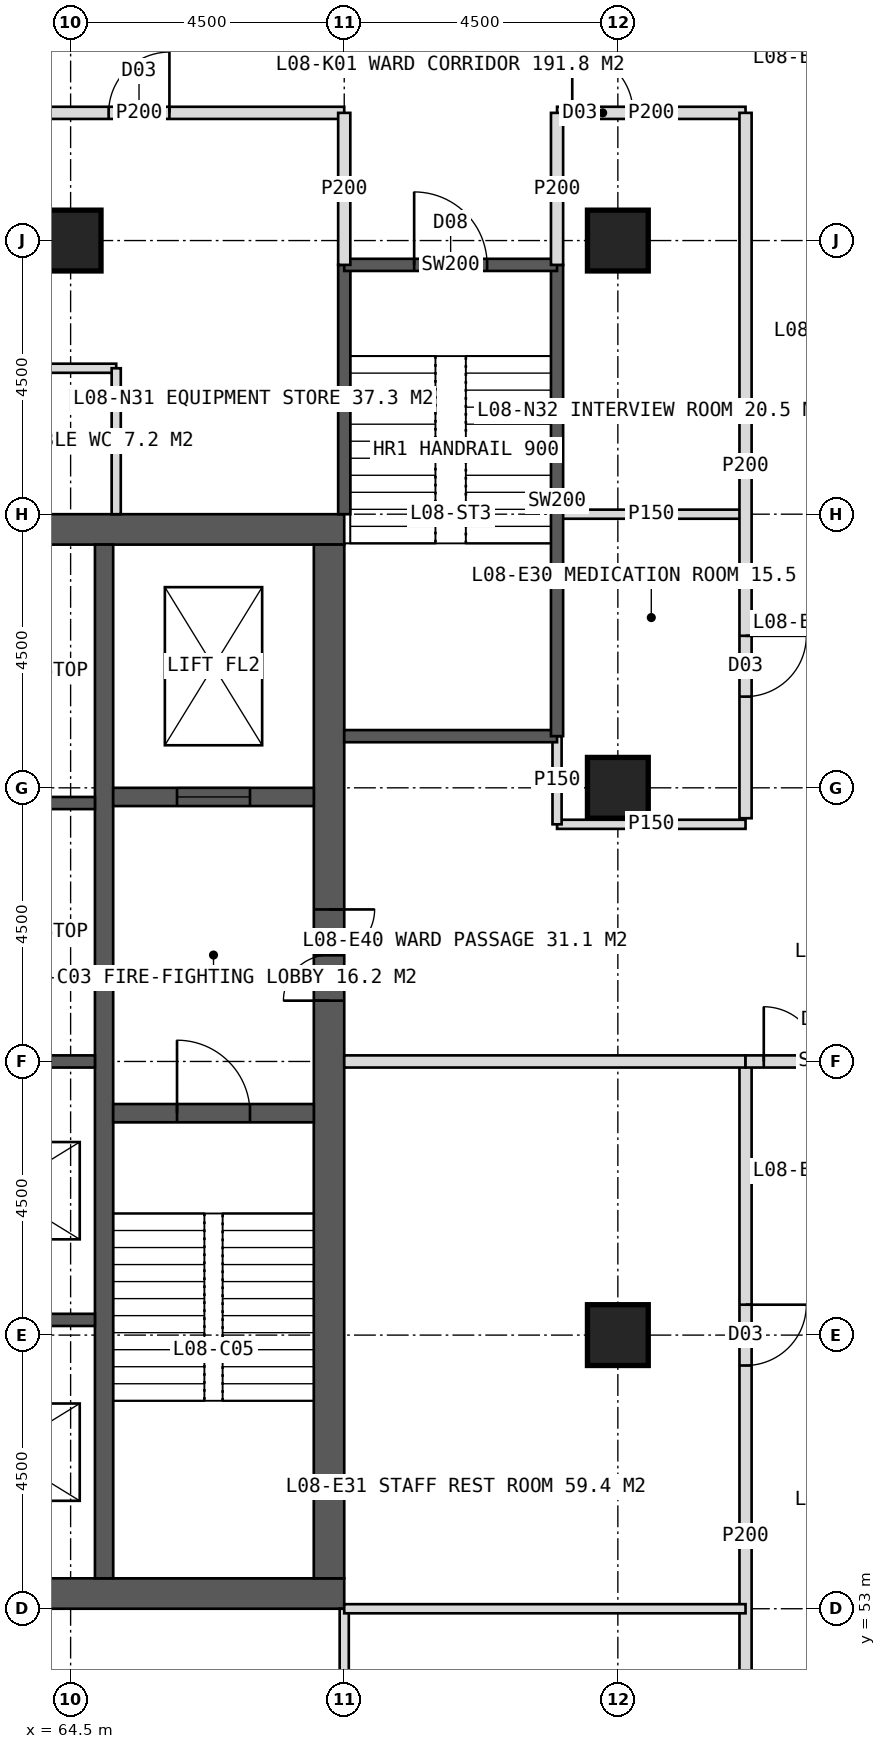
"""IFC4 building model, lengths in metres.
Left out: names, types, materials, properties, quantities, classifications, styles, units other than length and angle.
Written with IfcOpenShell. Run it as: python <this file> out.ifc"""

import sys

from ifc_helpers import new_model, si_unit, direction, frame, frame_2d, origin, origin_2d, place, context, subcontext, project, spatial, rectangle, hollow_rectangle, extrude, element, fill, save


model = new_model("IFC4")
c1 = context("Model", 3, precision=1e-05, world=origin(), true_north=direction((0.0, 1.0)))
c2 = subcontext(c1, "Body", "Model", "MODEL_VIEW")
j1 = project(units=[si_unit("LENGTHUNIT", "METRE"), si_unit("PLANEANGLEUNIT", "RADIAN")], contexts=[c1])
p1 = place(None, origin())
s1 = spatial("IfcSite", under=j1, at=p1, CompositionType="ELEMENT")
p2 = place(p1, origin())
s2 = spatial("IfcBuilding", under=s1, at=p2, CompositionType="ELEMENT")
p3 = place(p2, frame((0.0, 0.0, 39.0)))
s3 = spatial("IfcBuildingStorey", under=s2, at=p3, CompositionType="ELEMENT", Elevation=39.0)
p4 = place(p3, frame((51.0, 70.75, 0.0), z_axis=(0.0, 0.0, 1.0), x_axis=(1.0, 0.0, 0.0)))
e1 = element("IfcWall", 1, at=p4, inside=s3, PredefinedType="SHEAR", context=c2, shape_type="SweptSolid", body=[
    extrude(rectangle(XDim=18.0, YDim=0.5, at=frame_2d((9.0, 0.0))), origin(), (0.0, 0.0, 1.0), 4.0),
])
p5 = place(p4, frame((8.1, 0.0, 0.0)))
e2 = element("IfcOpeningElement", 2, at=p5, cuts=e1, PredefinedType="OPENING", context=c2, shape_type="SweptSolid", body=[
    extrude(rectangle(XDim=1.8, YDim=2.2, at=frame_2d((0.9, 1.1))), frame((0.0, 0.26, 0.0), z_axis=(0.0, -1.0, 0.0), x_axis=(1.0, 0.0, 0.0)), (0.0, 0.0, 1.0), 0.52),
])
p6 = place(p3, frame((51.0, 53.25, 0.0), z_axis=(0.0, 0.0, 1.0), x_axis=(1.0, 0.0, 0.0)))
e3 = element("IfcWall", 3, at=p6, inside=s3, PredefinedType="SHEAR", context=c2, shape_type="SweptSolid", body=[
    extrude(rectangle(XDim=18.0, YDim=0.5, at=frame_2d((9.0, 0.0))), origin(), (0.0, 0.0, 1.0), 4.0),
])
p7 = place(p6, frame((8.1, 0.0, 0.0)))
e4 = element("IfcOpeningElement", 4, at=p7, cuts=e3, PredefinedType="OPENING", context=c2, shape_type="SweptSolid", body=[
    extrude(rectangle(XDim=1.8, YDim=2.2, at=frame_2d((0.9, 1.1))), frame((0.0, 0.26, 0.0), z_axis=(0.0, -1.0, 0.0), x_axis=(1.0, 0.0, 0.0)), (0.0, 0.0, 1.0), 0.52),
])
p8 = place(p3, frame((68.75, 53.5, 0.0), z_axis=(0.0, 0.0, 1.0), x_axis=(0.0, 1.0, 0.0)))
e5 = element("IfcWall", 5, at=p8, inside=s3, PredefinedType="SHEAR", context=c2, shape_type="SweptSolid", body=[
    extrude(rectangle(XDim=17.0, YDim=0.5, at=frame_2d((8.5, 0.0))), origin(), (0.0, 0.0, 1.0), 4.0),
])
p9 = place(p8, frame((9.5, 0.0, 0.0)))
e6 = element("IfcOpeningElement", 6, at=p9, cuts=e5, PredefinedType="OPENING", context=c2, shape_type="SweptSolid", body=[
    extrude(rectangle(XDim=1.5, YDim=2.2, at=frame_2d((0.75, 1.1))), frame((0.0, 0.26, 0.0), z_axis=(0.0, -1.0, 0.0), x_axis=(1.0, 0.0, 0.0)), (0.0, 0.0, 1.0), 0.52),
])
p10 = place(p3, frame((65.05, 53.5, 0.0), z_axis=(0.0, 0.0, 1.0), x_axis=(0.0, 1.0, 0.0)))
e7 = element("IfcWall", 7, at=p10, inside=s3, PredefinedType="SHEAR", context=c2, shape_type="SweptSolid", body=[
    extrude(rectangle(XDim=17.0, YDim=0.3, at=frame_2d((8.5, 0.0))), origin(), (0.0, 0.0, 1.0), 4.0),
])
for number, where, z_axis, x_axis in (
    (8, (61.85, 57.75, 0.0), (0.0, 0.0, 1.0), (1.0, 0.0, 0.0)),
    (9, (61.85, 62.0, 0.0), (0.0, 0.0, 1.0), (1.0, 0.0, 0.0)),
    (10, (61.85, 66.25, 0.0), (0.0, 0.0, 1.0), (1.0, 0.0, 0.0)),
):
    element("IfcWall", number, at=place(p3, frame(where, z_axis=z_axis, x_axis=x_axis)), inside=s3, PredefinedType="SHEAR", context=c2, shape_type="SweptSolid", body=[
        extrude(rectangle(XDim=3.05, YDim=0.2, at=frame_2d((1.525, 0.0))), origin(), (0.0, 0.0, 1.0), 4.0),
    ])
p11 = place(p3, frame((65.2, 61.15, 0.0), z_axis=(0.0, 0.0, 1.0), x_axis=(1.0, 0.0, 0.0)))
e11 = element("IfcWall", 11, at=p11, inside=s3, PredefinedType="SHEAR", context=c2, shape_type="SweptSolid", body=[
    extrude(rectangle(XDim=3.3, YDim=0.3, at=frame_2d((1.65, 0.0))), origin(), (0.0, 0.0, 1.0), 4.0),
])
p12 = place(p11, frame((1.05, 0.0, 0.0)))
e12 = element("IfcOpeningElement", 12, at=p12, cuts=e11, PredefinedType="OPENING", context=c2, shape_type="SweptSolid", body=[
    extrude(rectangle(XDim=1.2, YDim=2.1, at=frame_2d((0.6, 1.05))), frame((0.0, 0.16, 0.0), z_axis=(0.0, -1.0, 0.0), x_axis=(1.0, 0.0, 0.0)), (0.0, 0.0, 1.0), 0.32),
])
p13 = place(p3, frame((65.2, 66.35, 0.0), z_axis=(0.0, 0.0, 1.0), x_axis=(1.0, 0.0, 0.0)))
e13 = element("IfcWall", 13, at=p13, inside=s3, PredefinedType="SHEAR", context=c2, shape_type="SweptSolid", body=[
    extrude(rectangle(XDim=3.3, YDim=0.3, at=frame_2d((1.65, 0.0))), origin(), (0.0, 0.0, 1.0), 4.0),
])
p14 = place(p13, frame((1.05, 0.0, 0.0)))
e14 = element("IfcOpeningElement", 14, at=p14, cuts=e13, PredefinedType="OPENING", context=c2, shape_type="SweptSolid", body=[
    extrude(rectangle(XDim=1.2, YDim=2.2, at=frame_2d((0.6, 1.1))), frame((0.0, 0.16, 0.0), z_axis=(0.0, -1.0, 0.0), x_axis=(1.0, 0.0, 0.0)), (0.0, 0.0, 1.0), 0.32),
])
for number, where, z_axis, x_axis in (
    (15, (73.5, 75.5, 0.0), (0.0, 0.0, 1.0), (1.0, 0.0, 0.0)),
    (16, (64.5, 75.5, 0.0), (0.0, 0.0, 1.0), (1.0, 0.0, 0.0)),
    (17, (73.5, 57.5, 0.0), (0.0, 0.0, 1.0), (1.0, 0.0, 0.0)),
    (18, (73.5, 66.5, 0.0), (0.0, 0.0, 1.0), (1.0, 0.0, 0.0)),
):
    element("IfcColumn", number, at=place(p3, frame(where, z_axis=z_axis, x_axis=x_axis)), inside=s3, PredefinedType="COLUMN", context=c2, shape_type="SweptSolid", body=[
        extrude(hollow_rectangle(XDim=1.0, YDim=1.0, WallThickness=0.1, at=origin_2d()), origin(), (0.0, 0.0, 1.0), 4.0),
    ])
p15 = place(p3, frame((62.25, 77.6, 0.0), z_axis=(0.0, 0.0, 1.0), x_axis=(1.0, 0.0, 0.0)))
e19 = element("IfcWall", 19, at=p15, inside=s3, PredefinedType="PARTITIONING", context=c2, shape_type="SweptSolid", body=[
    extrude(rectangle(XDim=6.75, YDim=0.2, at=frame_2d((3.375, 0.0))), origin(), (0.0, 0.0, 1.0), 3.75),
])
p16 = place(p15, frame((2.875, 0.0, 0.0)))
e20 = element("IfcOpeningElement", 20, at=p16, cuts=e19, PredefinedType="OPENING", context=c2, shape_type="SweptSolid", body=[
    extrude(rectangle(XDim=1.0, YDim=2.1, at=frame_2d((0.5, 1.05))), frame((0.0, 0.11, 0.0), z_axis=(0.0, -1.0, 0.0), x_axis=(1.0, 0.0, 0.0)), (0.0, 0.0, 1.0), 0.22),
])
p17 = place(p3, frame((72.5, 77.6, 0.0), z_axis=(0.0, 0.0, 1.0), x_axis=(1.0, 0.0, 0.0)))
e21 = element("IfcWall", 21, at=p17, inside=s3, PredefinedType="PARTITIONING", context=c2, shape_type="SweptSolid", body=[
    extrude(rectangle(XDim=3.1, YDim=0.2, at=frame_2d((1.55, 0.0))), origin(), (0.0, 0.0, 1.0), 3.75),
])
p18 = place(p17, frame((0.25, 0.0, 0.0)))
e22 = element("IfcOpeningElement", 22, at=p18, cuts=e21, PredefinedType="OPENING", context=c2, shape_type="SweptSolid", body=[
    extrude(rectangle(XDim=1.0, YDim=2.1, at=frame_2d((0.5, 1.05))), frame((0.0, 0.11, 0.0), z_axis=(0.0, -1.0, 0.0), x_axis=(1.0, 0.0, 0.0)), (0.0, 0.0, 1.0), 0.22),
])
p19 = place(p3, frame((62.25, 73.4, 0.0), z_axis=(0.0, 0.0, 1.0), x_axis=(1.0, 0.0, 0.0)))
e23 = element("IfcWall", 23, at=p19, inside=s3, PredefinedType="PARTITIONING", context=c2, shape_type="SweptSolid", body=[
    extrude(rectangle(XDim=3.0, YDim=0.15, at=frame_2d((1.5, 0.0))), origin(), (0.0, 0.0, 1.0), 3.75),
])
p20 = place(p3, frame((65.25, 71.0, 0.0), z_axis=(0.0, 0.0, 1.0), x_axis=(0.0, 1.0, 0.0)))
e24 = element("IfcWall", 24, at=p20, inside=s3, PredefinedType="PARTITIONING", context=c2, shape_type="SweptSolid", body=[
    extrude(rectangle(XDim=2.4, YDim=0.15, at=frame_2d((1.2, 0.0))), origin(), (0.0, 0.0, 1.0), 3.75),
])
p21 = place(p3, frame((69.0, 53.0, 0.0), z_axis=(0.0, 0.0, 1.0), x_axis=(0.0, -1.0, 0.0)))
e25 = element("IfcWall", 25, at=p21, inside=s3, PredefinedType="PARTITIONING", context=c2, shape_type="SweptSolid", body=[
    extrude(rectangle(XDim=6.6, YDim=0.15, at=frame_2d((3.3, 0.0))), origin(), (0.0, 0.0, 1.0), 3.75),
])
p22 = place(p3, frame((72.5, 71.0, 0.0), z_axis=(0.0, 0.0, 1.0), x_axis=(1.0, 0.0, 0.0)))
e26 = element("IfcWall", 26, at=p22, inside=s3, PredefinedType="PARTITIONING", context=c2, shape_type="SweptSolid", body=[
    extrude(rectangle(XDim=3.1, YDim=0.15, at=frame_2d((1.55, 0.0))), origin(), (0.0, 0.0, 1.0), 3.75),
])
p23 = place(p3, frame((75.6, 77.6, 0.0), z_axis=(0.0, 0.0, 1.0), x_axis=(0.0, -1.0, 0.0)))
e27 = element("IfcWall", 27, at=p23, inside=s3, PredefinedType="PARTITIONING", context=c2, shape_type="SweptSolid", body=[
    extrude(rectangle(XDim=11.6, YDim=0.2, at=frame_2d((5.8, 0.0))), origin(), (0.0, 0.0, 1.0), 3.75),
])
p24 = place(p23, frame((8.6, 0.0, 0.0)))
e28 = element("IfcOpeningElement", 28, at=p24, cuts=e27, PredefinedType="OPENING", context=c2, shape_type="SweptSolid", body=[
    extrude(rectangle(XDim=1.0, YDim=2.1, at=frame_2d((0.5, 1.05))), frame((0.0, 0.11, 0.0), z_axis=(0.0, -1.0, 0.0), x_axis=(1.0, 0.0, 0.0)), (0.0, 0.0, 1.0), 0.22),
])
p25 = place(p3, frame((75.6, 62.0, 0.0), z_axis=(0.0, 0.0, 1.0), x_axis=(0.0, -1.0, 0.0)))
e29 = element("IfcWall", 29, at=p25, inside=s3, PredefinedType="PARTITIONING", context=c2, shape_type="SweptSolid", body=[
    extrude(rectangle(XDim=15.6, YDim=0.2, at=frame_2d((7.8, 0.0))), origin(), (0.0, 0.0, 1.0), 3.75),
])
p26 = place(p25, frame((4.0, 0.0, 0.0)))
e30 = element("IfcOpeningElement", 30, at=p26, cuts=e29, PredefinedType="OPENING", context=c2, shape_type="SweptSolid", body=[
    extrude(rectangle(XDim=1.0, YDim=2.1, at=frame_2d((0.5, 1.05))), frame((0.0, 0.11, 0.0), z_axis=(0.0, -1.0, 0.0), x_axis=(1.0, 0.0, 0.0)), (0.0, 0.0, 1.0), 0.22),
])
p27 = place(p25, frame((11.8, 0.0, 0.0)))
e31 = element("IfcOpeningElement", 31, at=p27, cuts=e29, PredefinedType="OPENING", context=c2, shape_type="SweptSolid", body=[
    extrude(rectangle(XDim=1.0, YDim=2.1, at=frame_2d((0.5, 1.05))), frame((0.0, 0.11, 0.0), z_axis=(0.0, -1.0, 0.0), x_axis=(1.0, 0.0, 0.0)), (0.0, 0.0, 1.0), 0.22),
])
p28 = place(p3, frame((72.5, 65.9, 0.0), z_axis=(0.0, 0.0, 1.0), x_axis=(1.0, 0.0, 0.0)))
e32 = element("IfcWall", 32, at=p28, inside=s3, PredefinedType="PARTITIONING", context=c2, shape_type="SweptSolid", body=[
    extrude(rectangle(XDim=3.1, YDim=0.15, at=frame_2d((1.55, 0.0))), origin(), (0.0, 0.0, 1.0), 3.75),
])
p29 = place(p3, frame((69.0, 62.0, 0.0), z_axis=(0.0, 0.0, 1.0), x_axis=(1.0, 0.0, 0.0)))
e33 = element("IfcWall", 33, at=p29, inside=s3, PredefinedType="SOLIDWALL", context=c2, shape_type="SweptSolid", body=[
    extrude(rectangle(XDim=6.6, YDim=0.2, at=frame_2d((3.3, 0.0))), origin(), (0.0, 0.0, 1.0), 2.75),
])
p30 = place(p3, frame((69.0, 53.0, 0.0), z_axis=(0.0, 0.0, 1.0), x_axis=(1.0, 0.0, 0.0)))
e34 = element("IfcWall", 34, at=p30, inside=s3, PredefinedType="PARTITIONING", context=c2, shape_type="SweptSolid", body=[
    extrude(rectangle(XDim=6.6, YDim=0.15, at=frame_2d((3.3, 0.0))), origin(), (0.0, 0.0, 1.0), 3.75),
])
p31 = place(p3, frame((75.6, 62.0, 0.0), z_axis=(0.0, 0.0, 1.0), x_axis=(1.0, 0.0, 0.0)))
e35 = element("IfcWall", 35, at=p31, inside=s3, PredefinedType="SOLIDWALL", context=c2, shape_type="SweptSolid", body=[
    extrude(rectangle(XDim=2.7, YDim=0.2, at=frame_2d((1.35, 0.0))), origin(), (0.0, 0.0, 1.0), 2.75),
])
p32 = place(p31, frame((0.3, 0.0, 0.0)))
e36 = element("IfcOpeningElement", 36, at=p32, cuts=e35, PredefinedType="OPENING", context=c2, shape_type="SweptSolid", body=[
    extrude(rectangle(XDim=1.8, YDim=2.2, at=frame_2d((0.9, 1.1))), frame((0.0, 0.11, 0.0), z_axis=(0.0, -1.0, 0.0), x_axis=(1.0, 0.0, 0.0)), (0.0, 0.0, 1.0), 0.22),
])
p33 = place(p3, frame((72.5, 65.9, 0.0), z_axis=(0.0, 0.0, 1.0), x_axis=(0.0, 1.0, 0.0)))
e37 = element("IfcWall", 37, at=p33, inside=s3, PredefinedType="PARTITIONING", context=c2, shape_type="SweptSolid", body=[
    extrude(rectangle(XDim=1.45, YDim=0.15, at=frame_2d((0.725, 0.0))), origin(), (0.0, 0.0, 1.0), 3.75),
])
p34 = place(p3, frame((69.0, 71.0, 0.0), z_axis=(0.0, 0.0, 1.0), x_axis=(0.0, 1.0, 0.0)))
e38 = element("IfcWall", 38, at=p34, inside=s3, PredefinedType="SOLIDWALL", context=c2, shape_type="SweptSolid", body=[
    extrude(rectangle(XDim=4.1, YDim=0.2, at=frame_2d((2.05, 0.0))), origin(), (0.0, 0.0, 1.0), 3.75),
])
p35 = place(p3, frame((69.0, 67.35, 0.0), z_axis=(0.0, 0.0, 1.0), x_axis=(1.0, 0.0, 0.0)))
e39 = element("IfcWall", 39, at=p35, inside=s3, PredefinedType="SOLIDWALL", context=c2, shape_type="SweptSolid", body=[
    extrude(rectangle(XDim=3.5, YDim=0.2, at=frame_2d((1.75, 0.0))), origin(), (0.0, 0.0, 1.0), 3.75),
])
p36 = place(p3, frame((72.5, 67.35, 0.0), z_axis=(0.0, 0.0, 1.0), x_axis=(0.0, 1.0, 0.0)))
e40 = element("IfcWall", 40, at=p36, inside=s3, PredefinedType="SOLIDWALL", context=c2, shape_type="SweptSolid", body=[
    extrude(rectangle(XDim=7.75, YDim=0.2, at=frame_2d((3.875, 0.0))), origin(), (0.0, 0.0, 1.0), 3.75),
])
p37 = place(p3, frame((69.0, 75.1, 0.0), z_axis=(0.0, 0.0, 1.0), x_axis=(1.0, 0.0, 0.0)))
e41 = element("IfcWall", 41, at=p37, inside=s3, PredefinedType="SOLIDWALL", context=c2, shape_type="SweptSolid", body=[
    extrude(rectangle(XDim=3.5, YDim=0.2, at=frame_2d((1.75, 0.0))), origin(), (0.0, 0.0, 1.0), 3.75),
])
p38 = place(p37, frame((1.15, 0.0, 0.0)))
e42 = element("IfcOpeningElement", 42, at=p38, cuts=e41, PredefinedType="OPENING", context=c2, shape_type="SweptSolid", body=[
    extrude(rectangle(XDim=1.2, YDim=2.1, at=frame_2d((0.6, 1.05))), frame((0.0, 0.11, 0.0), z_axis=(0.0, -1.0, 0.0), x_axis=(1.0, 0.0, 0.0)), (0.0, 0.0, 1.0), 0.22),
])
for number, where, z_axis, x_axis in (
    (43, (69.0, 75.1, 0.0), (0.0, 0.0, 1.0), (0.0, 1.0, 0.0)),
    (44, (72.5, 75.1, 0.0), (0.0, 0.0, 1.0), (0.0, 1.0, 0.0)),
):
    element("IfcWall", number, at=place(p3, frame(where, z_axis=z_axis, x_axis=x_axis)), inside=s3, PredefinedType="PARTITIONING", context=c2, shape_type="SweptSolid", body=[
        extrude(rectangle(XDim=2.5, YDim=0.2, at=frame_2d((1.25, 0.0))), origin(), (0.0, 0.0, 1.0), 3.75),
    ])
p39 = place(p16, origin())
e45 = element("IfcDoor", 45, at=p39, inside=s3, OperationType="SINGLE_SWING_RIGHT", PredefinedType="DOOR", context=c2, shape_type="SweptSolid", body=[
    extrude(rectangle(XDim=1.0, YDim=2.1, at=frame_2d((0.5, 1.05))), frame((0.0, 0.025, 0.0), z_axis=(0.0, -1.0, 0.0), x_axis=(1.0, 0.0, 0.0)), (0.0, 0.0, 1.0), 0.05),
])
fill(e20, e45)
p40 = place(p18, origin())
e46 = element("IfcDoor", 46, at=p40, inside=s3, OperationType="SINGLE_SWING_LEFT", PredefinedType="DOOR", context=c2, shape_type="SweptSolid", body=[
    extrude(rectangle(XDim=1.0, YDim=2.1, at=frame_2d((0.5, 1.05))), frame((0.0, 0.025, 0.0), z_axis=(0.0, -1.0, 0.0), x_axis=(1.0, 0.0, 0.0)), (0.0, 0.0, 1.0), 0.05),
])
fill(e22, e46)
p41 = place(p24, origin())
e47 = element("IfcDoor", 47, at=p41, inside=s3, OperationType="SINGLE_SWING_LEFT", PredefinedType="DOOR", context=c2, shape_type="SweptSolid", body=[
    extrude(rectangle(XDim=1.0, YDim=2.1, at=frame_2d((0.5, 1.05))), frame((0.0, 0.025, 0.0), z_axis=(0.0, -1.0, 0.0), x_axis=(1.0, 0.0, 0.0)), (0.0, 0.0, 1.0), 0.05),
])
fill(e28, e47)
p42 = place(p26, origin())
e48 = element("IfcDoor", 48, at=p42, inside=s3, OperationType="SINGLE_SWING_LEFT", PredefinedType="DOOR", context=c2, shape_type="SweptSolid", body=[
    extrude(rectangle(XDim=1.0, YDim=2.1, at=frame_2d((0.5, 1.05))), frame((0.0, 0.025, 0.0), z_axis=(0.0, -1.0, 0.0), x_axis=(1.0, 0.0, 0.0)), (0.0, 0.0, 1.0), 0.05),
])
fill(e30, e48)
p43 = place(p32, origin())
e49 = element("IfcDoor", 49, at=p43, inside=s3, OperationType="DOUBLE_DOOR_DOUBLE_SWING", PredefinedType="DOOR", context=c2, shape_type="SweptSolid", body=[
    extrude(rectangle(XDim=1.8, YDim=2.2, at=frame_2d((0.9, 1.1))), frame((0.0, 0.025, 0.0), z_axis=(0.0, -1.0, 0.0), x_axis=(1.0, 0.0, 0.0)), (0.0, 0.0, 1.0), 0.05),
])
fill(e36, e49)
p44 = place(p9, origin())
e50 = element("IfcDoor", 50, at=p44, inside=s3, OperationType="DOUBLE_DOOR_SINGLE_SWING", PredefinedType="DOOR", context=c2, shape_type="SweptSolid", body=[
    extrude(rectangle(XDim=1.5, YDim=2.2, at=frame_2d((0.75, 1.1))), frame((0.0, 0.025, 0.0), z_axis=(0.0, -1.0, 0.0), x_axis=(1.0, 0.0, 0.0)), (0.0, 0.0, 1.0), 0.05),
])
fill(e6, e50)
p45 = place(p12, origin())
e51 = element("IfcDoor", 51, at=p45, inside=s3, OperationType="SINGLE_SWING_LEFT", PredefinedType="DOOR", context=c2, shape_type="SweptSolid", body=[
    extrude(rectangle(XDim=1.2, YDim=2.1, at=frame_2d((0.6, 1.05))), frame((0.0, 0.025, 0.0), z_axis=(0.0, -1.0, 0.0), x_axis=(1.0, 0.0, 0.0)), (0.0, 0.0, 1.0), 0.05),
])
fill(e12, e51)
p46 = place(p14, origin())
e52 = element("IfcDoor", 52, at=p46, inside=s3, OperationType="SLIDING_TO_LEFT", PredefinedType="DOOR", context=c2, shape_type="SweptSolid", body=[
    extrude(rectangle(XDim=1.2, YDim=2.2, at=frame_2d((0.6, 1.1))), frame((0.0, 0.025, 0.0), z_axis=(0.0, -1.0, 0.0), x_axis=(1.0, 0.0, 0.0)), (0.0, 0.0, 1.0), 0.05),
])
fill(e14, e52)
p47 = place(p38, origin())
e53 = element("IfcDoor", 53, at=p47, inside=s3, OperationType="SINGLE_SWING_LEFT", PredefinedType="DOOR", context=c2, shape_type="SweptSolid", body=[
    extrude(rectangle(XDim=1.2, YDim=2.1, at=frame_2d((0.6, 1.05))), frame((0.0, 0.025, 0.0), z_axis=(0.0, -1.0, 0.0), x_axis=(1.0, 0.0, 0.0)), (0.0, 0.0, 1.0), 0.05),
])
fill(e42, e53)
save(model, sys.argv[1])
